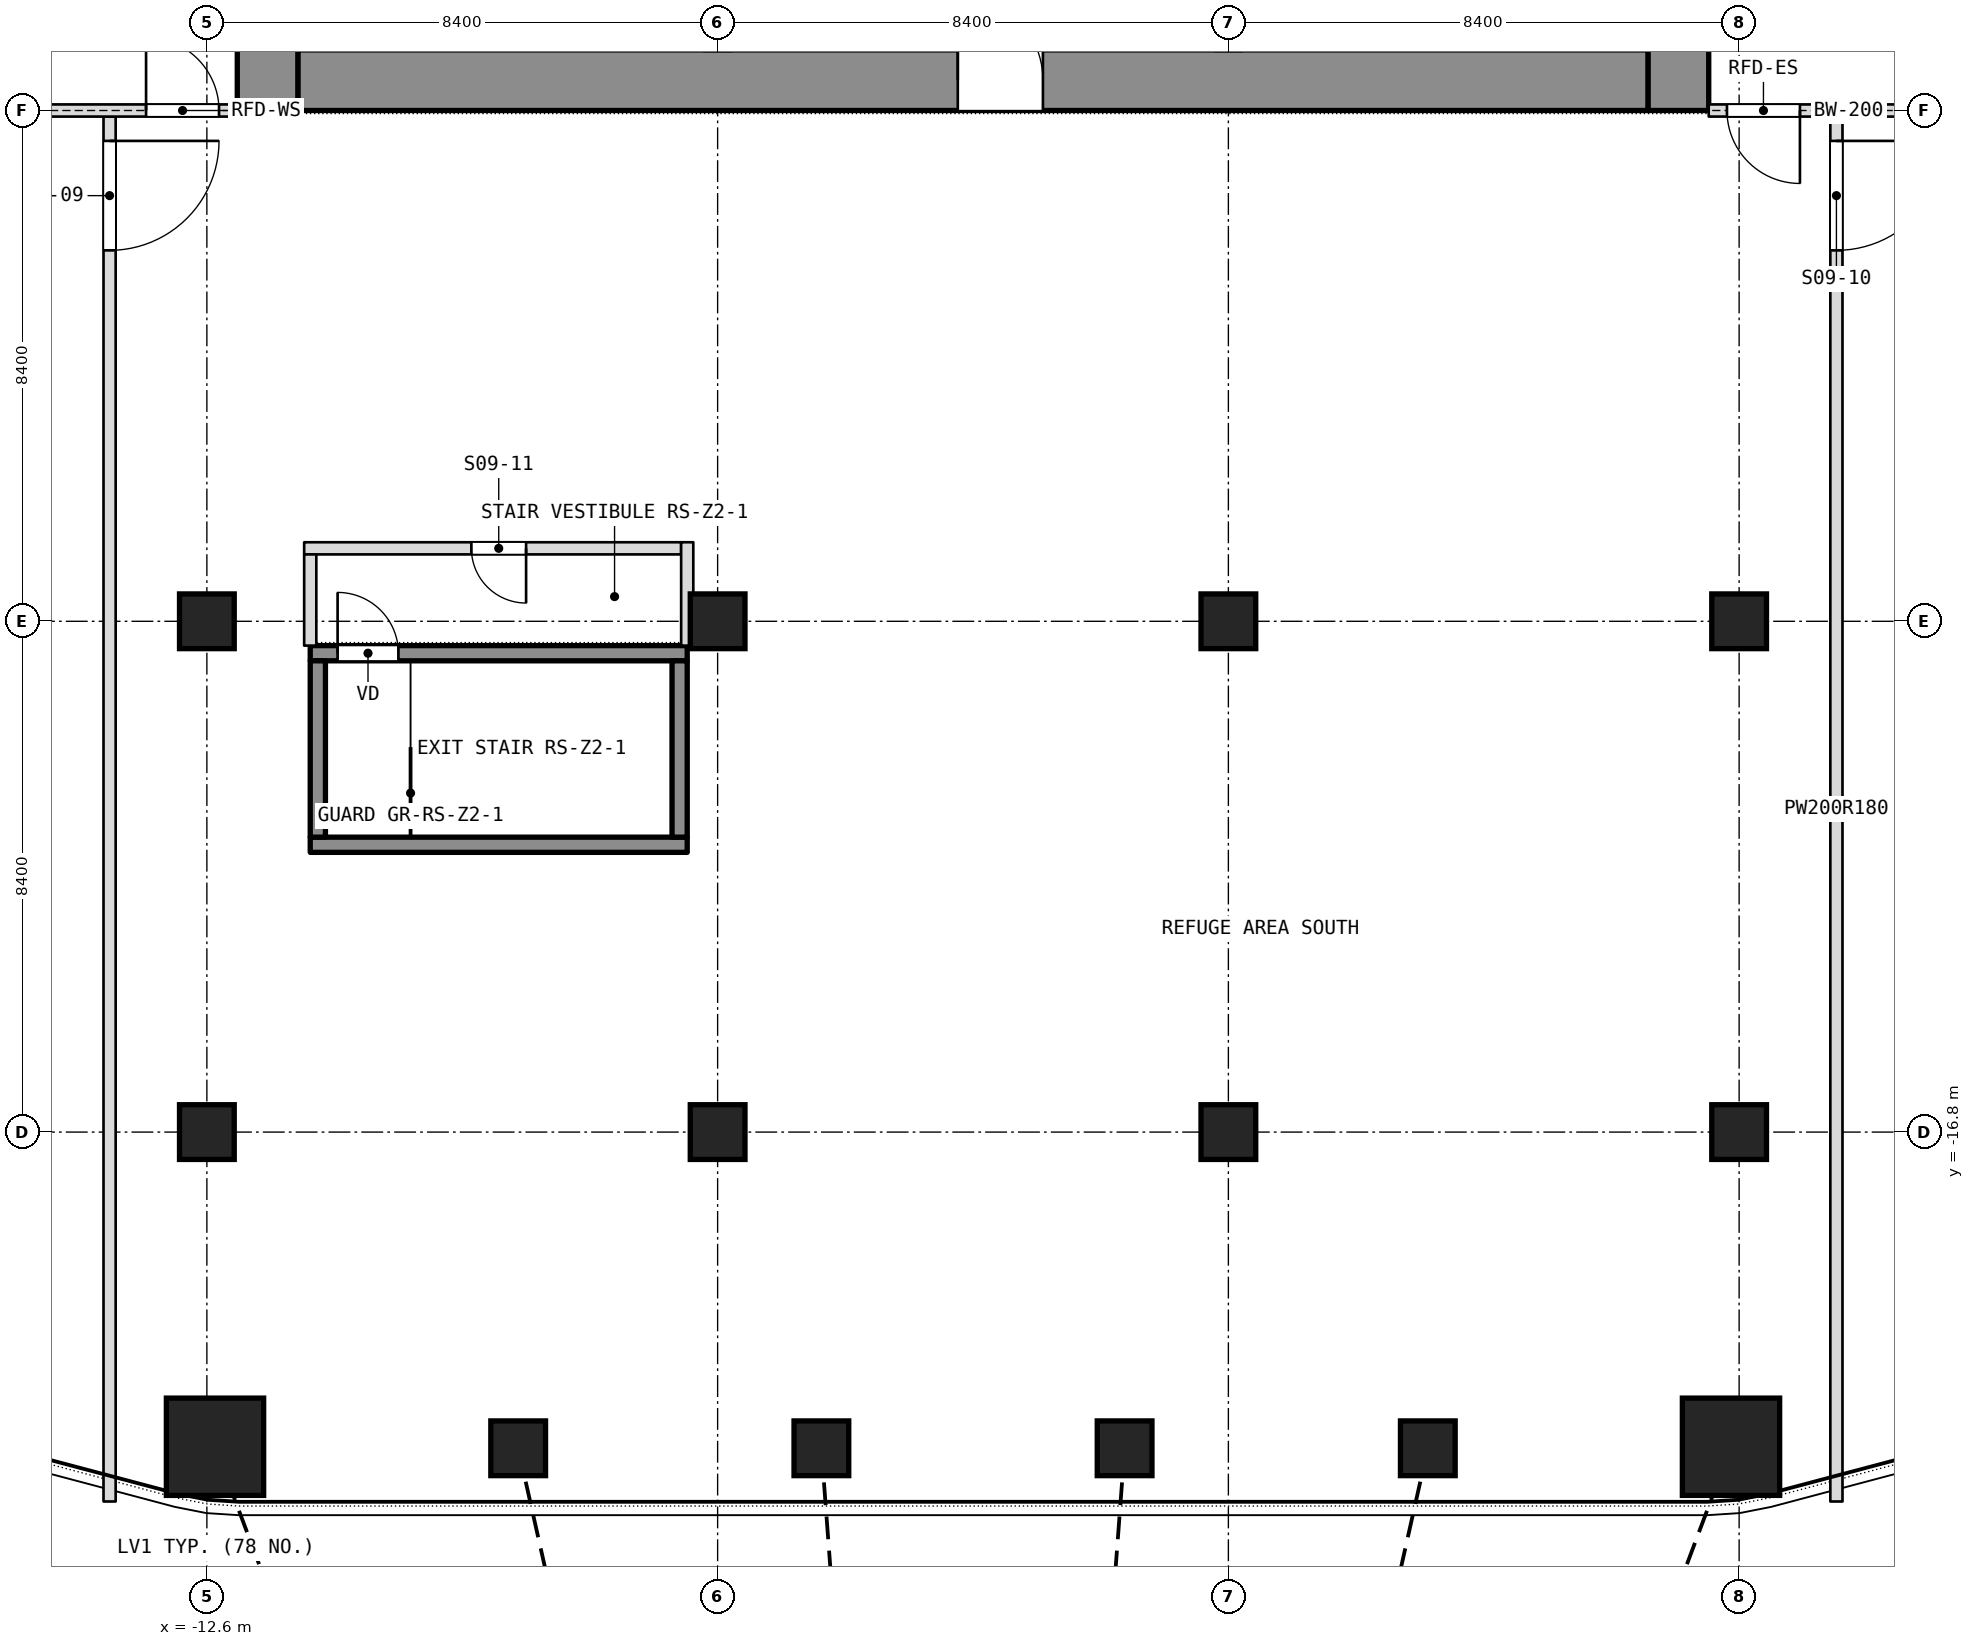
"""IFC4 building model, lengths in metres.
Left out: names, types, materials, properties, quantities, classifications, styles, units other than length and angle.
Written with IfcOpenShell. Run it as: python <this file> out.ifc"""

import sys

from ifc_helpers import new_model, si_unit, direction, frame, frame_2d, origin, origin_2d, place, context, subcontext, project, spatial, rectangle, extrude, element, fill, save


model = new_model("IFC4")
c1 = context("Model", 3, precision=1e-05, world=origin(), true_north=direction((0.0, 1.0)))
c2 = subcontext(c1, "Body", "Model", "MODEL_VIEW")
j1 = project(units=[si_unit("LENGTHUNIT", "METRE"), si_unit("PLANEANGLEUNIT", "RADIAN")], contexts=[c1])
p1 = place(None, origin())
s1 = spatial("IfcSite", under=j1, at=p1, CompositionType="ELEMENT")
p2 = place(p1, origin())
s2 = spatial("IfcBuilding", under=s1, at=p2, CompositionType="ELEMENT")
p3 = place(p2, frame((0.0, 0.0, 169.7)))
s3 = spatial("IfcBuildingStorey", under=s2, at=p3, CompositionType="ELEMENT", Elevation=169.7)
p4 = place(p3, frame((11.6, 0.0, 0.0), z_axis=(0.0, 0.0, 1.0), x_axis=(0.0, 1.0, 0.0)))
e1 = element("IfcWall", 1, at=p4, inside=s3, PredefinedType="SHEAR", context=c2, shape_type="SweptSolid", body=[
    extrude(rectangle(XDim=16.8, YDim=1.0, at=frame_2d((8.4, 0.0))), origin(), (0.0, 0.0, 1.0), 10.8),
])
p5 = place(p4, frame((6.825, 0.0, 0.0)))
e2 = element("IfcOpeningElement", 2, at=p5, cuts=e1, PredefinedType="OPENING", context=c2, shape_type="SweptSolid", body=[
    extrude(rectangle(XDim=1.2, YDim=2.1, at=frame_2d((0.6, 1.05))), frame((0.0, 0.5, 0.0), z_axis=(0.0, -1.0, 0.0), x_axis=(1.0, 0.0, 0.0)), (0.0, 0.0, 1.0), 1.0),
])
p6 = place(p4, frame((8.775, 0.0, 0.0)))
e3 = element("IfcOpeningElement", 3, at=p6, cuts=e1, PredefinedType="OPENING", context=c2, shape_type="SweptSolid", body=[
    extrude(rectangle(XDim=1.2, YDim=2.1, at=frame_2d((0.6, 1.05))), frame((0.0, 0.5, 0.0), z_axis=(0.0, -1.0, 0.0), x_axis=(1.0, 0.0, 0.0)), (0.0, 0.0, 1.0), 1.0),
])
p7 = place(p3, frame((-11.6, 0.0, 0.0), z_axis=(0.0, 0.0, 1.0), x_axis=(0.0, 1.0, 0.0)))
e4 = element("IfcWall", 4, at=p7, inside=s3, PredefinedType="SHEAR", context=c2, shape_type="SweptSolid", body=[
    extrude(rectangle(XDim=16.8, YDim=1.0, at=frame_2d((8.4, 0.0))), origin(), (0.0, 0.0, 1.0), 10.8),
])
p8 = place(p7, frame((3.6, 0.0, 0.0)))
e5 = element("IfcOpeningElement", 5, at=p8, cuts=e4, PredefinedType="OPENING", context=c2, shape_type="SweptSolid", body=[
    extrude(rectangle(XDim=0.9, YDim=2.1, at=frame_2d((0.45, 1.05))), frame((0.0, 0.5, 0.0), z_axis=(0.0, -1.0, 0.0), x_axis=(1.0, 0.0, 0.0)), (0.0, 0.0, 1.0), 1.0),
])
p9 = place(p7, frame((6.825, 0.0, 0.0)))
e6 = element("IfcOpeningElement", 6, at=p9, cuts=e4, PredefinedType="OPENING", context=c2, shape_type="SweptSolid", body=[
    extrude(rectangle(XDim=1.2, YDim=2.1, at=frame_2d((0.6, 1.05))), frame((0.0, 0.5, 0.0), z_axis=(0.0, -1.0, 0.0), x_axis=(1.0, 0.0, 0.0)), (0.0, 0.0, 1.0), 1.0),
])
p10 = place(p7, frame((12.3, 0.0, 0.0)))
e7 = element("IfcOpeningElement", 7, at=p10, cuts=e4, PredefinedType="OPENING", context=c2, shape_type="SweptSolid", body=[
    extrude(rectangle(XDim=0.9, YDim=2.1, at=frame_2d((0.45, 1.05))), frame((0.0, 0.5, 0.0), z_axis=(0.0, -1.0, 0.0), x_axis=(1.0, 0.0, 0.0)), (0.0, 0.0, 1.0), 1.0),
])
p11 = place(p7, frame((8.775, 0.0, 0.0)))
e8 = element("IfcOpeningElement", 8, at=p11, cuts=e4, PredefinedType="OPENING", context=c2, shape_type="SweptSolid", body=[
    extrude(rectangle(XDim=1.2, YDim=2.1, at=frame_2d((0.6, 1.05))), frame((0.0, 0.5, 0.0), z_axis=(0.0, -1.0, 0.0), x_axis=(1.0, 0.0, 0.0)), (0.0, 0.0, 1.0), 1.0),
])
p12 = place(p3, frame((-11.1, 0.5, 0.0), z_axis=(0.0, 0.0, 1.0), x_axis=(1.0, 0.0, 0.0)))
e9 = element("IfcWall", 9, at=p12, inside=s3, PredefinedType="SHEAR", context=c2, shape_type="SweptSolid", body=[
    extrude(rectangle(XDim=22.2, YDim=1.0, at=frame_2d((11.1, 0.0))), origin(), (0.0, 0.0, 1.0), 10.8),
])
p13 = place(p12, frame((10.85, 0.0, 0.0)))
e10 = element("IfcOpeningElement", 10, at=p13, cuts=e9, PredefinedType="OPENING", context=c2, shape_type="SweptSolid", body=[
    extrude(rectangle(XDim=1.4, YDim=2.1, at=frame_2d((0.7, 1.05))), frame((0.0, 0.5, 0.0), z_axis=(0.0, -1.0, 0.0), x_axis=(1.0, 0.0, 0.0)), (0.0, 0.0, 1.0), 1.0),
])
for number, where, z_axis, x_axis in (
    (11, (-12.6, -16.8, 0.0), (0.0, 0.0, 1.0), (1.0, 0.0, 0.0)),
    (12, (-12.6, -8.4, 0.0), (0.0, 0.0, 1.0), (1.0, 0.0, 0.0)),
    (13, (-4.2, -16.8, 0.0), (0.0, 0.0, 1.0), (1.0, 0.0, 0.0)),
    (14, (-4.2, -8.4, 0.0), (0.0, 0.0, 1.0), (1.0, 0.0, 0.0)),
    (15, (4.2, -16.8, 0.0), (0.0, 0.0, 1.0), (1.0, 0.0, 0.0)),
    (16, (4.2, -8.4, 0.0), (0.0, 0.0, 1.0), (1.0, 0.0, 0.0)),
    (17, (12.6, -16.8, 0.0), (0.0, 0.0, 1.0), (1.0, 0.0, 0.0)),
    (18, (12.6, -8.4, 0.0), (0.0, 0.0, 1.0), (1.0, 0.0, 0.0)),
):
    element("IfcColumn", number, at=place(p3, frame(where, z_axis=z_axis, x_axis=x_axis)), inside=s3, PredefinedType="COLUMN", context=c2, shape_type="SweptSolid", body=[
        extrude(rectangle(XDim=0.9, YDim=0.9, at=origin_2d()), origin(), (0.0, 0.0, 1.0), 10.8),
    ])
p14 = place(p3, frame((14.2, -22.875, 0.0), z_axis=(0.0, 0.0, 1.0), x_axis=(0.0, 1.0, 0.0)))
e19 = element("IfcWall", 19, at=p14, inside=s3, PredefinedType="PARTITIONING", context=c2, shape_type="SweptSolid", body=[
    extrude(rectangle(XDim=22.775, YDim=0.2, at=frame_2d((11.387, 0.0))), origin(), (0.0, 0.0, 1.0), 10.54),
])
p15 = place(p14, frame((20.575, 0.0, 0.0)))
e20 = element("IfcOpeningElement", 20, at=p15, cuts=e19, PredefinedType="OPENING", context=c2, shape_type="SweptSolid", body=[
    extrude(rectangle(XDim=1.8, YDim=2.1, at=frame_2d((0.9, 1.05))), frame((0.0, 0.1, 0.0), z_axis=(0.0, -1.0, 0.0), x_axis=(1.0, 0.0, 0.0)), (0.0, 0.0, 1.0), 0.2),
])
p16 = place(p3, frame((-11.0, -7.2, 0.0), z_axis=(0.0, 0.0, 1.0), x_axis=(1.0, 0.0, 0.0)))
e21 = element("IfcWall", 21, at=p16, inside=s3, PredefinedType="PARTITIONING", context=c2, shape_type="SweptSolid", body=[
    extrude(rectangle(XDim=6.2, YDim=0.2, at=frame_2d((3.1, 0.0))), origin(), (0.0, 0.0, 1.0), 10.54),
])
p17 = place(p16, frame((2.75, 0.0, 0.0)))
e22 = element("IfcOpeningElement", 22, at=p17, cuts=e21, PredefinedType="OPENING", context=c2, shape_type="SweptSolid", body=[
    extrude(rectangle(XDim=0.9, YDim=2.1, at=frame_2d((0.45, 1.05))), frame((0.0, 0.1, 0.0), z_axis=(0.0, -1.0, 0.0), x_axis=(1.0, 0.0, 0.0)), (0.0, 0.0, 1.0), 0.2),
])
p18 = place(p3, frame((-4.7, -8.8, 0.0), z_axis=(0.0, 0.0, 1.0), x_axis=(0.0, 1.0, 0.0)))
e23 = element("IfcWall", 23, at=p18, inside=s3, PredefinedType="PARTITIONING", context=c2, shape_type="SweptSolid", body=[
    extrude(rectangle(XDim=1.7, YDim=0.2, at=frame_2d((0.85, 0.0))), origin(), (0.0, 0.0, 1.0), 10.54),
])
p19 = place(p3, frame((-10.9, -8.8, 0.0), z_axis=(0.0, 0.0, 1.0), x_axis=(0.0, 1.0, 0.0)))
e24 = element("IfcWall", 24, at=p19, inside=s3, PredefinedType="PARTITIONING", context=c2, shape_type="SweptSolid", body=[
    extrude(rectangle(XDim=1.5, YDim=0.2, at=frame_2d((0.75, 0.0))), origin(), (0.0, 0.0, 1.0), 10.54),
])
p20 = place(p3, frame((-14.2, -22.875, 0.0), z_axis=(0.0, 0.0, 1.0), x_axis=(0.0, 1.0, 0.0)))
e25 = element("IfcWall", 25, at=p20, inside=s3, PredefinedType="PARTITIONING", context=c2, shape_type="SweptSolid", body=[
    extrude(rectangle(XDim=22.775, YDim=0.2, at=frame_2d((11.387, 0.0))), origin(), (0.0, 0.0, 1.0), 10.54),
])
p21 = place(p20, frame((20.575, 0.0, 0.0)))
e26 = element("IfcOpeningElement", 26, at=p21, cuts=e25, PredefinedType="OPENING", context=c2, shape_type="SweptSolid", body=[
    extrude(rectangle(XDim=1.8, YDim=2.1, at=frame_2d((0.9, 1.05))), frame((0.0, 0.1, 0.0), z_axis=(0.0, -1.0, 0.0), x_axis=(1.0, 0.0, 0.0)), (0.0, 0.0, 1.0), 0.2),
])
p22 = place(p3, frame((-16.7, 0.0, 0.0), z_axis=(0.0, 0.0, 1.0), x_axis=(1.0, 0.0, 0.0)))
e27 = element("IfcWall", 27, at=p22, inside=s3, PredefinedType="PARTITIONING", context=c2, shape_type="SweptSolid", body=[
    extrude(rectangle(XDim=4.6, YDim=0.2, at=frame_2d((2.3, 0.0))), origin(), (0.0, 0.0, 1.0), 10.14),
])
p23 = place(p22, frame((3.1, 0.0, 0.0)))
e28 = element("IfcOpeningElement", 28, at=p23, cuts=e27, PredefinedType="OPENING", context=c2, shape_type="SweptSolid", body=[
    extrude(rectangle(XDim=1.2, YDim=2.1, at=frame_2d((0.6, 1.05))), frame((0.0, 0.1, 0.0), z_axis=(0.0, -1.0, 0.0), x_axis=(1.0, 0.0, 0.0)), (0.0, 0.0, 1.0), 0.2),
])
p24 = place(p3, frame((12.1, 0.0, 0.0), z_axis=(0.0, 0.0, 1.0), x_axis=(1.0, 0.0, 0.0)))
e29 = element("IfcWall", 29, at=p24, inside=s3, PredefinedType="PARTITIONING", context=c2, shape_type="SweptSolid", body=[
    extrude(rectangle(XDim=4.6, YDim=0.2, at=frame_2d((2.3, 0.0))), origin(), (0.0, 0.0, 1.0), 10.14),
])
p25 = place(p24, frame((0.3, 0.0, 0.0)))
e30 = element("IfcOpeningElement", 30, at=p25, cuts=e29, PredefinedType="OPENING", context=c2, shape_type="SweptSolid", body=[
    extrude(rectangle(XDim=1.2, YDim=2.1, at=frame_2d((0.6, 1.05))), frame((0.0, 0.1, 0.0), z_axis=(0.0, -1.0, 0.0), x_axis=(1.0, 0.0, 0.0)), (0.0, 0.0, 1.0), 0.2),
])
p26 = place(p3, frame((-10.9, -12.075, 0.1), z_axis=(0.0, 0.0, 1.0), x_axis=(1.0, 0.0, 0.0)))
e31 = element("IfcWall", 31, at=p26, inside=s3, PredefinedType="SHEAR", context=c2, shape_type="SweptSolid", body=[
    extrude(rectangle(XDim=6.2, YDim=0.25, at=frame_2d((3.1, 0.0))), origin(), (0.0, 0.0, 1.0), 10.44),
])
p27 = place(p3, frame((-10.9, -8.925, 0.1), z_axis=(0.0, 0.0, 1.0), x_axis=(1.0, 0.0, 0.0)))
e32 = element("IfcWall", 32, at=p27, inside=s3, PredefinedType="SHEAR", context=c2, shape_type="SweptSolid", body=[
    extrude(rectangle(XDim=6.2, YDim=0.25, at=frame_2d((3.1, 0.0))), origin(), (0.0, 0.0, 1.0), 10.44),
])
p28 = place(p27, frame((0.45, 0.0, 0.0)))
e33 = element("IfcOpeningElement", 33, at=p28, cuts=e32, PredefinedType="OPENING", context=c2, shape_type="SweptSolid", body=[
    extrude(rectangle(XDim=1.0, YDim=2.1, at=frame_2d((0.5, 1.05))), frame((0.0, 0.125, 0.0), z_axis=(0.0, -1.0, 0.0), x_axis=(1.0, 0.0, 0.0)), (0.0, 0.0, 1.0), 0.25),
])
for number, where, z_axis, x_axis in (
    (34, (-10.775, -11.95, 0.1), (0.0, 0.0, 1.0), (0.0, 1.0, 0.0)),
    (35, (-4.825, -11.95, 0.1), (0.0, 0.0, 1.0), (0.0, 1.0, 0.0)),
):
    element("IfcWall", number, at=place(p3, frame(where, z_axis=z_axis, x_axis=x_axis)), inside=s3, PredefinedType="SHEAR", context=c2, shape_type="SweptSolid", body=[
        extrude(rectangle(XDim=2.9, YDim=0.25, at=frame_2d((1.45, 0.0))), origin(), (0.0, 0.0, 1.0), 10.44),
    ])
p29 = place(p21, origin())
e36 = element("IfcDoor", 36, at=p29, inside=s3, OperationType="DOUBLE_DOOR_SINGLE_SWING", PredefinedType="DOOR", context=c2, shape_type="SweptSolid", body=[
    extrude(rectangle(XDim=1.8, YDim=2.1, at=frame_2d((0.9, 1.05))), frame((0.0, 0.025, 0.0), z_axis=(0.0, -1.0, 0.0), x_axis=(1.0, 0.0, 0.0)), (0.0, 0.0, 1.0), 0.05),
])
fill(e26, e36)
p30 = place(p15, origin())
e37 = element("IfcDoor", 37, at=p30, inside=s3, OperationType="DOUBLE_DOOR_SINGLE_SWING", PredefinedType="DOOR", context=c2, shape_type="SweptSolid", body=[
    extrude(rectangle(XDim=1.8, YDim=2.1, at=frame_2d((0.9, 1.05))), frame((0.0, 0.025, 0.0), z_axis=(0.0, -1.0, 0.0), x_axis=(1.0, 0.0, 0.0)), (0.0, 0.0, 1.0), 0.05),
])
fill(e20, e37)
p31 = place(p17, origin())
e38 = element("IfcDoor", 38, at=p31, inside=s3, OperationType="SINGLE_SWING_LEFT", PredefinedType="DOOR", context=c2, shape_type="SweptSolid", body=[
    extrude(rectangle(XDim=0.9, YDim=2.1, at=frame_2d((0.45, 1.05))), frame((0.0, 0.025, 0.0), z_axis=(0.0, -1.0, 0.0), x_axis=(1.0, 0.0, 0.0)), (0.0, 0.0, 1.0), 0.05),
])
fill(e22, e38)
p32 = place(p28, origin())
e39 = element("IfcDoor", 39, at=p32, inside=s3, OperationType="SINGLE_SWING_LEFT", PredefinedType="DOOR", context=c2, shape_type="SweptSolid", body=[
    extrude(rectangle(XDim=1.0, YDim=2.1, at=frame_2d((0.5, 1.05))), frame((0.0, 0.025, 0.0), z_axis=(0.0, -1.0, 0.0), x_axis=(1.0, 0.0, 0.0)), (0.0, 0.0, 1.0), 0.05),
])
fill(e33, e39)
p33 = place(p13, origin())
e40 = element("IfcDoor", 40, at=p33, inside=s3, OperationType="SINGLE_SWING_LEFT", PredefinedType="DOOR", context=c2, shape_type="SweptSolid", body=[
    extrude(rectangle(XDim=1.4, YDim=2.1, at=frame_2d((0.7, 1.05))), frame((0.0, 0.025, 0.0), z_axis=(0.0, -1.0, 0.0), x_axis=(1.0, 0.0, 0.0)), (0.0, 0.0, 1.0), 0.05),
])
fill(e10, e40)
p34 = place(p23, origin())
e41 = element("IfcDoor", 41, at=p34, inside=s3, OperationType="SINGLE_SWING_LEFT", PredefinedType="DOOR", context=c2, shape_type="SweptSolid", body=[
    extrude(rectangle(XDim=1.2, YDim=2.1, at=frame_2d((0.6, 1.05))), frame((0.0, 0.025, 0.0), z_axis=(0.0, -1.0, 0.0), x_axis=(1.0, 0.0, 0.0)), (0.0, 0.0, 1.0), 0.05),
])
fill(e28, e41)
p35 = place(p25, origin())
e42 = element("IfcDoor", 42, at=p35, inside=s3, OperationType="SINGLE_SWING_LEFT", PredefinedType="DOOR", context=c2, shape_type="SweptSolid", body=[
    extrude(rectangle(XDim=1.2, YDim=2.1, at=frame_2d((0.6, 1.05))), frame((0.0, 0.025, 0.0), z_axis=(0.0, -1.0, 0.0), x_axis=(1.0, 0.0, 0.0)), (0.0, 0.0, 1.0), 0.05),
])
fill(e30, e42)
save(model, sys.argv[1])
